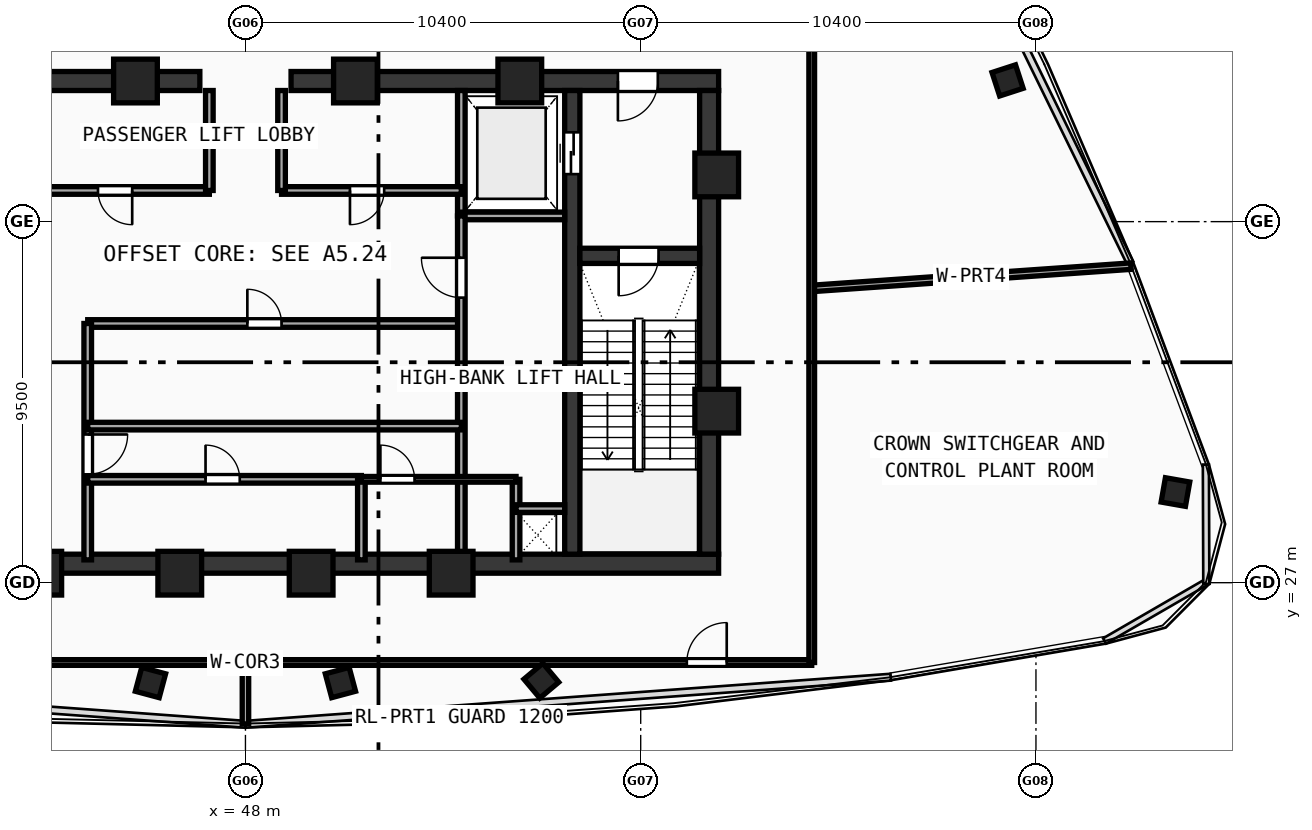
"""IFC4 building model, lengths in metres.
Left out: names, types, materials, properties, quantities, classifications, styles, units other than length and angle.
Written with IfcOpenShell. Run it as: python <this file> out.ifc"""

import sys

from ifc_helpers import new_model, si_unit, direction, frame, frame_2d, origin, origin_with_axes, origin_2d, place, context, subcontext, project, spatial, rectangle, hollow_rectangle, extrude, source, transform, mapped, element, fill, save


model = new_model("IFC4")
c1 = context("Model", 3, precision=1e-05, world=origin(), true_north=direction((0.0, 1.0)))
c2 = subcontext(c1, "Body", "Model", "MODEL_VIEW")
j1 = project(units=[si_unit("LENGTHUNIT", "METRE"), si_unit("PLANEANGLEUNIT", "RADIAN")], contexts=[c1])
p1 = place(None, origin())
s1 = spatial("IfcSite", under=j1, at=p1, CompositionType="ELEMENT")
p2 = place(p1, origin())
s2 = spatial("IfcBuilding", under=s1, at=p2, CompositionType="ELEMENT")
p3 = place(p2, frame((0.0, 0.0, 386.76)))
s3 = spatial("IfcBuildingStorey", under=s2, at=p3, CompositionType="ELEMENT", Elevation=386.76)
p4 = place(p3, frame((35.55, 27.5, 0.0), z_axis=(0.0, 0.0, 1.0), x_axis=(1.0, 0.0, 0.0)))
e1 = element("IfcWall", 1, at=p4, inside=s3, PredefinedType="SHEAR", context=c2, shape_type="SweptSolid", body=[
    extrude(rectangle(XDim=24.9, YDim=0.5, at=frame_2d((12.45, 0.0))), origin(), (0.0, 0.0, 1.0), 4.72),
])
p5 = place(p3, frame((35.55, 40.2, 0.0), z_axis=(0.0, 0.0, 1.0), x_axis=(1.0, 0.0, 0.0)))
e2 = element("IfcWall", 2, at=p5, inside=s3, PredefinedType="SHEAR", context=c2, shape_type="SweptSolid", body=[
    extrude(rectangle(XDim=11.25, YDim=0.5, at=frame_2d((5.625, 0.0))), origin(), (0.0, 0.0, 1.0), 4.72),
])
p6 = place(p5, frame((1.6, 0.0, 0.0)))
e3 = element("IfcOpeningElement", 3, at=p6, cuts=e2, PredefinedType="OPENING", context=c2, shape_type="SweptSolid", body=[
    extrude(rectangle(XDim=1.05, YDim=2.1, at=frame_2d((0.525, 1.05))), frame((0.0, 0.26, 0.0), z_axis=(0.0, -1.0, 0.0), x_axis=(1.0, 0.0, 0.0)), (0.0, 0.0, 1.0), 0.52),
])
p7 = place(p3, frame((49.2, 40.2, 0.0), z_axis=(0.0, 0.0, 1.0), x_axis=(1.0, 0.0, 0.0)))
e4 = element("IfcWall", 4, at=p7, inside=s3, PredefinedType="SHEAR", context=c2, shape_type="SweptSolid", body=[
    extrude(rectangle(XDim=11.25, YDim=0.5, at=frame_2d((5.625, 0.0))), origin(), (0.0, 0.0, 1.0), 4.72),
])
p8 = place(p7, frame((8.6, 0.0, 0.0)))
e5 = element("IfcOpeningElement", 5, at=p8, cuts=e4, PredefinedType="OPENING", context=c2, shape_type="SweptSolid", body=[
    extrude(rectangle(XDim=1.05, YDim=2.1, at=frame_2d((0.525, 1.05))), frame((0.0, 0.26, 0.0), z_axis=(0.0, -1.0, 0.0), x_axis=(1.0, 0.0, 0.0)), (0.0, 0.0, 1.0), 0.52),
])
p9 = place(p3, frame((60.2, 27.75, 0.0), z_axis=(0.0, 0.0, 1.0), x_axis=(0.0, 1.0, 0.0)))
e6 = element("IfcWall", 6, at=p9, inside=s3, PredefinedType="SHEAR", context=c2, shape_type="SweptSolid", body=[
    extrude(rectangle(XDim=12.2, YDim=0.5, at=frame_2d((6.1, 0.0))), origin(), (0.0, 0.0, 1.0), 4.72),
])
p10 = place(p3, frame((56.6, 27.75, 0.0), z_axis=(0.0, 0.0, 1.0), x_axis=(0.0, 1.0, 0.0)))
e7 = element("IfcWall", 7, at=p10, inside=s3, PredefinedType="SHEAR", context=c2, shape_type="SweptSolid", body=[
    extrude(rectangle(XDim=12.2, YDim=0.4, at=frame_2d((6.1, 0.0))), origin(), (0.0, 0.0, 1.0), 4.72),
])
p11 = place(p10, frame((10.0, 0.0, 0.0)))
e8 = element("IfcOpeningElement", 8, at=p11, cuts=e7, PredefinedType="OPENING", context=c2, shape_type="SweptSolid", body=[
    extrude(rectangle(XDim=1.1, YDim=2.1, at=frame_2d((0.55, 1.05))), frame((0.0, 0.21, 0.0), z_axis=(0.0, -1.0, 0.0), x_axis=(1.0, 0.0, 0.0)), (0.0, 0.0, 1.0), 0.42),
])
p12 = place(p3, frame((56.8, 35.6, 0.0), z_axis=(0.0, 0.0, 1.0), x_axis=(1.0, 0.0, 0.0)))
e9 = element("IfcWall", 9, at=p12, inside=s3, PredefinedType="SHEAR", context=c2, shape_type="SweptSolid", body=[
    extrude(rectangle(XDim=3.15, YDim=0.4, at=frame_2d((1.575, 0.0))), origin(), (0.0, 0.0, 1.0), 4.72),
])
p13 = place(p12, frame((1.02, 0.0, 0.0)))
e10 = element("IfcOpeningElement", 10, at=p13, cuts=e9, PredefinedType="OPENING", context=c2, shape_type="SweptSolid", body=[
    extrude(rectangle(XDim=1.05, YDim=2.1, at=frame_2d((0.525, 1.05))), frame((0.0, 0.21, 0.0), z_axis=(0.0, -1.0, 0.0), x_axis=(1.0, 0.0, 0.0)), (0.0, 0.0, 1.0), 0.42),
])
m1 = source(origin(), c2, "Body", "SweptSolid", [
    extrude(hollow_rectangle(XDim=1.15, YDim=1.15, WallThickness=0.048, at=origin_2d()), origin(), (0.0, 0.0, 1.0), 5.0),
])
for number, where, z_axis, x_axis in (
    (11, (42.588, 27.25, -0.28), (0.0, 0.0, 1.0), (1.0, 0.0, 0.0)),
    (12, (46.272, 27.25, -0.28), (0.0, 0.0, 1.0), (1.0, 0.0, 0.0)),
    (13, (49.729, 27.25, -0.28), (0.0, 0.0, 1.0), (1.0, 0.0, 0.0)),
    (14, (53.412, 27.25, -0.28), (0.0, 0.0, 1.0), (1.0, 0.0, 0.0)),
    (15, (60.4, 31.513, -0.28), (0.0, 0.0, 1.0), (1.0, 0.0, 0.0)),
    (16, (60.4, 37.729, -0.28), (0.0, 0.0, 1.0), (1.0, 0.0, 0.0)),
    (17, (55.219, 40.2, -0.28), (0.0, 0.0, 1.0), (1.0, 0.0, 0.0)),
    (18, (50.894, 40.2, -0.28), (0.0, 0.0, 1.0), (1.0, 0.0, 0.0)),
    (19, (45.106, 40.2, -0.28), (0.0, 0.0, 1.0), (1.0, 0.0, 0.0)),
):
    element("IfcColumn", number, at=place(p3, frame(where, z_axis=z_axis, x_axis=x_axis)), inside=s3, PredefinedType="COLUMN", context=c2, shape_type="MappedRepresentation", body=[
        mapped(m1, transform((0.0, 0.0, 0.0), scale=1.0)),
    ])
m2 = source(origin(), c2, "Body", "SweptSolid", [
    extrude(hollow_rectangle(XDim=0.65, YDim=0.65, WallThickness=0.024, at=origin_2d()), origin(), (0.0, 0.0, 1.0), 5.0),
])
for number, where, z_axis, x_axis in (
    (20, (45.501, 24.373, -0.28), (0.0, 0.0, 1.0), (0.966, -0.259, 0.0)),
    (21, (50.499, 24.373, -0.28), (0.0, 0.0, 1.0), (0.966, 0.259, 0.0)),
    (22, (55.785, 24.422, -0.28), (0.0, 0.0, 1.0), (0.766, 0.643, 0.0)),
    (23, (72.47, 29.385, -0.28), (0.0, 0.0, 1.0), (0.174, 0.985, 0.0)),
    (24, (68.053, 40.216, -0.28), (0.0, 0.0, 1.0), (-0.309, 0.951, 0.0)),
):
    element("IfcColumn", number, at=place(p3, frame(where, z_axis=z_axis, x_axis=x_axis)), inside=s3, PredefinedType="COLUMN", context=c2, shape_type="MappedRepresentation", body=[
        mapped(m2, transform((0.0, 0.0, 0.0), scale=1.0)),
    ])
p14 = place(p3, frame((53.68, 36.65, 0.0), z_axis=(0.0, 0.0, 1.0), x_axis=(0.0, 1.0, 0.0)))
e25 = element("IfcWall", 25, at=p14, inside=s3, PredefinedType="SOLIDWALL", context=c2, shape_type="SweptSolid", body=[
    extrude(rectangle(XDim=3.3, YDim=0.2, at=frame_2d((1.65, 0.0))), origin(), (0.0, 0.0, 1.0), 4.72),
])
p15 = place(p3, frame((53.68, 36.65, 0.0), z_axis=(0.0, 0.0, 1.0), x_axis=(1.0, 0.0, 0.0)))
e26 = element("IfcWall", 26, at=p15, inside=s3, PredefinedType="SOLIDWALL", context=c2, shape_type="SweptSolid", body=[
    extrude(rectangle(XDim=2.72, YDim=0.2, at=frame_2d((1.36, 0.0))), origin(), (0.0, 0.0, 1.0), 4.72),
])
p16 = place(p3, frame((42.32, 37.32, 0.0), z_axis=(0.0, 0.0, 1.0), x_axis=(1.0, 0.0, 0.0)))
e27 = element("IfcWall", 27, at=p16, inside=s3, PredefinedType="SOLIDWALL", context=c2, shape_type="SweptSolid", body=[
    extrude(rectangle(XDim=4.73, YDim=0.2, at=frame_2d((2.365, 0.0))), origin(), (0.0, 0.0, 1.0), 4.72),
])
p17 = place(p16, frame((1.8, 0.0, 0.0)))
e28 = element("IfcOpeningElement", 28, at=p17, cuts=e27, PredefinedType="OPENING", context=c2, shape_type="SweptSolid", body=[
    extrude(rectangle(XDim=0.9, YDim=2.1, at=frame_2d((0.45, 1.05))), frame((0.0, 0.11, 0.0), z_axis=(0.0, -1.0, 0.0), x_axis=(1.0, 0.0, 0.0)), (0.0, 0.0, 1.0), 0.22),
])
p18 = place(p3, frame((48.95, 37.32, 0.0), z_axis=(0.0, 0.0, 1.0), x_axis=(1.0, 0.0, 0.0)))
e29 = element("IfcWall", 29, at=p18, inside=s3, PredefinedType="SOLIDWALL", context=c2, shape_type="SweptSolid", body=[
    extrude(rectangle(XDim=4.73, YDim=0.2, at=frame_2d((2.365, 0.0))), origin(), (0.0, 0.0, 1.0), 4.72),
])
p19 = place(p18, frame((1.8, 0.0, 0.0)))
e30 = element("IfcOpeningElement", 30, at=p19, cuts=e29, PredefinedType="OPENING", context=c2, shape_type="SweptSolid", body=[
    extrude(rectangle(XDim=0.9, YDim=2.1, at=frame_2d((0.45, 1.05))), frame((0.0, 0.11, 0.0), z_axis=(0.0, -1.0, 0.0), x_axis=(1.0, 0.0, 0.0)), (0.0, 0.0, 1.0), 0.22),
])
for number, where, z_axis, x_axis in (
    (31, (47.05, 37.32, 0.0), (0.0, 0.0, 1.0), (0.0, 1.0, 0.0)),
    (32, (48.95, 37.32, 0.0), (0.0, 0.0, 1.0), (0.0, 1.0, 0.0)),
):
    element("IfcWall", number, at=place(p3, frame(where, z_axis=z_axis, x_axis=x_axis)), inside=s3, PredefinedType="SOLIDWALL", context=c2, shape_type="SweptSolid", body=[
        extrude(rectangle(XDim=2.63, YDim=0.2, at=frame_2d((1.315, 0.0))), origin(), (0.0, 0.0, 1.0), 4.72),
    ])
p20 = place(p3, frame((43.85, 33.82, 0.0), z_axis=(0.0, 0.0, 1.0), x_axis=(1.0, 0.0, 0.0)))
e33 = element("IfcWall", 33, at=p20, inside=s3, PredefinedType="SOLIDWALL", context=c2, shape_type="SweptSolid", body=[
    extrude(rectangle(XDim=9.83, YDim=0.2, at=frame_2d((4.915, 0.0))), origin(), (0.0, 0.0, 1.0), 4.72),
])
p21 = place(p20, frame((4.2, 0.0, 0.0)))
e34 = element("IfcOpeningElement", 34, at=p21, cuts=e33, PredefinedType="OPENING", context=c2, shape_type="SweptSolid", body=[
    extrude(rectangle(XDim=0.9, YDim=2.1, at=frame_2d((0.45, 1.05))), frame((0.0, 0.11, 0.0), z_axis=(0.0, -1.0, 0.0), x_axis=(1.0, 0.0, 0.0)), (0.0, 0.0, 1.0), 0.22),
])
p22 = place(p3, frame((43.85, 27.6, 0.0), z_axis=(0.0, 0.0, 1.0), x_axis=(0.0, 1.0, 0.0)))
e35 = element("IfcWall", 35, at=p22, inside=s3, PredefinedType="SOLIDWALL", context=c2, shape_type="SweptSolid", body=[
    extrude(rectangle(XDim=6.22, YDim=0.2, at=frame_2d((3.11, 0.0))), origin(), (0.0, 0.0, 1.0), 4.72),
])
p23 = place(p22, frame((2.25, 0.0, 0.0)))
e36 = element("IfcOpeningElement", 36, at=p23, cuts=e35, PredefinedType="OPENING", context=c2, shape_type="SweptSolid", body=[
    extrude(rectangle(XDim=1.05, YDim=2.1, at=frame_2d((0.525, 1.05))), frame((0.0, 0.11, 0.0), z_axis=(0.0, -1.0, 0.0), x_axis=(1.0, 0.0, 0.0)), (0.0, 0.0, 1.0), 0.22),
])
p24 = place(p3, frame((53.68, 27.6, 0.0), z_axis=(0.0, 0.0, 1.0), x_axis=(0.0, 1.0, 0.0)))
e37 = element("IfcWall", 37, at=p24, inside=s3, PredefinedType="SOLIDWALL", context=c2, shape_type="SweptSolid", body=[
    extrude(rectangle(XDim=9.05, YDim=0.2, at=frame_2d((4.525, 0.0))), origin(), (0.0, 0.0, 1.0), 4.72),
])
p25 = place(p24, frame((6.9, 0.0, 0.0)))
e38 = element("IfcOpeningElement", 38, at=p25, cuts=e37, PredefinedType="OPENING", context=c2, shape_type="SweptSolid", body=[
    extrude(rectangle(XDim=1.05, YDim=2.1, at=frame_2d((0.525, 1.05))), frame((0.0, 0.11, 0.0), z_axis=(0.0, -1.0, 0.0), x_axis=(1.0, 0.0, 0.0)), (0.0, 0.0, 1.0), 0.22),
])
p26 = place(p3, frame((43.85, 29.72, 0.0), z_axis=(0.0, 0.0, 1.0), x_axis=(1.0, 0.0, 0.0)))
e39 = element("IfcWall", 39, at=p26, inside=s3, PredefinedType="SOLIDWALL", context=c2, shape_type="SweptSolid", body=[
    extrude(rectangle(XDim=7.2, YDim=0.2, at=frame_2d((3.6, 0.0))), origin(), (0.0, 0.0, 1.0), 4.72),
])
p27 = place(p26, frame((3.1, 0.0, 0.0)))
e40 = element("IfcOpeningElement", 40, at=p27, cuts=e39, PredefinedType="OPENING", context=c2, shape_type="SweptSolid", body=[
    extrude(rectangle(XDim=0.9, YDim=2.1, at=frame_2d((0.45, 1.05))), frame((0.0, 0.11, 0.0), z_axis=(0.0, -1.0, 0.0), x_axis=(1.0, 0.0, 0.0)), (0.0, 0.0, 1.0), 0.22),
])
p28 = place(p3, frame((51.05, 27.6, 0.0), z_axis=(0.0, 0.0, 1.0), x_axis=(0.0, 1.0, 0.0)))
e41 = element("IfcWall", 41, at=p28, inside=s3, PredefinedType="SOLIDWALL", context=c2, shape_type="SweptSolid", body=[
    extrude(rectangle(XDim=2.12, YDim=0.2, at=frame_2d((1.06, 0.0))), origin(), (0.0, 0.0, 1.0), 4.72),
])
p29 = place(p3, frame((43.85, 31.12, 0.0), z_axis=(0.0, 0.0, 1.0), x_axis=(1.0, 0.0, 0.0)))
e42 = element("IfcWall", 42, at=p29, inside=s3, PredefinedType="SOLIDWALL", context=c2, shape_type="SweptSolid", body=[
    extrude(rectangle(XDim=9.83, YDim=0.2, at=frame_2d((4.915, 0.0))), origin(), (0.0, 0.0, 1.0), 4.72),
])
p30 = place(p3, frame((55.12, 27.6, 0.0), z_axis=(0.0, 0.0, 1.0), x_axis=(0.0, 1.0, 0.0)))
e43 = element("IfcWall", 43, at=p30, inside=s3, PredefinedType="SOLIDWALL", context=c2, shape_type="SweptSolid", body=[
    extrude(rectangle(XDim=2.12, YDim=0.2, at=frame_2d((1.06, 0.0))), origin(), (0.0, 0.0, 1.0), 4.72),
])
p31 = place(p3, frame((55.12, 28.95, 0.0), z_axis=(0.0, 0.0, 1.0), x_axis=(1.0, 0.0, 0.0)))
e44 = element("IfcWall", 44, at=p31, inside=s3, PredefinedType="SOLIDWALL", context=c2, shape_type="SweptSolid", body=[
    extrude(rectangle(XDim=1.28, YDim=0.2, at=frame_2d((0.64, 0.0))), origin(), (0.0, 0.0, 1.0), 4.72),
])
p32 = place(p3, frame((51.05, 29.72, 0.0), z_axis=(0.0, 0.0, 1.0), x_axis=(1.0, 0.0, 0.0)))
e45 = element("IfcWall", 45, at=p32, inside=s3, PredefinedType="PARTITIONING", context=c2, shape_type="SweptSolid", body=[
    extrude(rectangle(XDim=4.07, YDim=0.15, at=frame_2d((2.035, 0.0))), origin(), (0.0, 0.0, 1.0), 4.72),
])
p33 = place(p32, frame((0.5, 0.0, 0.0)))
e46 = element("IfcOpeningElement", 46, at=p33, cuts=e45, PredefinedType="OPENING", context=c2, shape_type="SweptSolid", body=[
    extrude(rectangle(XDim=0.9, YDim=2.1, at=frame_2d((0.45, 1.05))), frame((0.0, 0.085, 0.0), z_axis=(0.0, -1.0, 0.0), x_axis=(1.0, 0.0, 0.0)), (0.0, 0.0, 1.0), 0.17),
])
p34 = place(p3, frame((62.9, 34.742, 0.0), z_axis=(0.0, 0.0, 1.0), x_axis=(0.997563993403, 0.069757286835, 0.0)))
e47 = element("IfcWall", 47, at=p34, inside=s3, PredefinedType="PARTITIONING", context=c2, shape_type="SweptSolid", body=[
    extrude(rectangle(XDim=8.421, YDim=0.17, at=frame_2d((4.21, 0.0))), origin(), (0.0, 0.0, 1.0), 4.12),
])
p35 = place(p3, frame((48.0, 24.9, 0.0), z_axis=(0.0, 0.0, 1.0), x_axis=(0.0, -1.0, 0.0)))
e48 = element("IfcWall", 48, at=p35, inside=s3, PredefinedType="PARTITIONING", context=c2, shape_type="SweptSolid", body=[
    extrude(rectangle(XDim=1.616, YDim=0.17, at=frame_2d((0.808, 0.0))), origin(), (0.0, 0.0, 1.0), 4.12),
])
p36 = place(p3, frame((33.1, 24.9, 0.0), z_axis=(0.0, 0.0, 1.0), x_axis=(1.0, 0.0, 0.0)))
e49 = element("IfcWall", 49, at=p36, inside=s3, PredefinedType="PARTITIONING", context=c2, shape_type="SweptSolid", body=[
    extrude(rectangle(XDim=29.8, YDim=0.15, at=frame_2d((14.9, 0.0))), origin(), (0.0, 0.0, 1.0), 4.12),
])
p37 = place(p36, frame((2.236, 0.0, 0.0)))
e50 = element("IfcOpeningElement", 50, at=p37, cuts=e49, PredefinedType="OPENING", context=c2, shape_type="SweptSolid", body=[
    extrude(rectangle(XDim=1.05, YDim=2.1, at=frame_2d((0.525, 1.05))), frame((0.0, 0.085, 0.0), z_axis=(0.0, -1.0, 0.0), x_axis=(1.0, 0.0, 0.0)), (0.0, 0.0, 1.0), 0.17),
])
p38 = place(p36, frame((26.514, 0.0, 0.0)))
e51 = element("IfcOpeningElement", 51, at=p38, cuts=e49, PredefinedType="OPENING", context=c2, shape_type="SweptSolid", body=[
    extrude(rectangle(XDim=1.05, YDim=2.1, at=frame_2d((0.525, 1.05))), frame((0.0, 0.085, 0.0), z_axis=(0.0, -1.0, 0.0), x_axis=(1.0, 0.0, 0.0)), (0.0, 0.0, 1.0), 0.17),
])
p39 = place(p3, frame((62.9, 24.9, 0.0), z_axis=(0.0, 0.0, 1.0), x_axis=(0.0, 1.0, 0.0)))
e52 = element("IfcWall", 52, at=p39, inside=s3, PredefinedType="PARTITIONING", context=c2, shape_type="SweptSolid", body=[
    extrude(rectangle(XDim=18.0, YDim=0.15, at=frame_2d((9.0, 0.0))), origin(), (0.0, 0.0, 1.0), 4.12),
])
m3 = source(origin(), c2, "Body", "SweptSolid", [
    extrude(rectangle(XDim=1.05, YDim=2.1, at=frame_2d((0.525, 1.05))), frame((0.0, 0.025, 0.0), z_axis=(0.0, -1.0, 0.0), x_axis=(1.0, 0.0, 0.0)), (0.0, 0.0, 1.0), 0.05),
])
p40 = place(p13, frame((1.05, 0.0, 0.0), z_axis=(0.0, 0.0, 1.0), x_axis=(-1.0, 0.0, 0.0)))
e53 = element("IfcDoor", 53, at=p40, inside=s3, OperationType="SINGLE_SWING_RIGHT", PredefinedType="DOOR", context=c2, shape_type="MappedRepresentation", body=[
    mapped(m3, transform((0.0, 0.0, 0.0), scale=1.0)),
])
fill(e10, e53)
p41 = place(p8, frame((1.05, 0.0, 0.0), z_axis=(0.0, 0.0, 1.0), x_axis=(-1.0, 0.0, 0.0)))
e54 = element("IfcDoor", 54, at=p41, inside=s3, OperationType="SINGLE_SWING_RIGHT", PredefinedType="DOOR", context=c2, shape_type="MappedRepresentation", body=[
    mapped(m3, transform((0.0, 0.0, 0.0), scale=1.0)),
])
fill(e5, e54)
m4 = source(origin(), c2, "Body", "SweptSolid", [
    extrude(rectangle(XDim=1.1, YDim=2.1, at=frame_2d((0.55, 1.05))), frame((0.0, 0.025, 0.0), z_axis=(0.0, -1.0, 0.0), x_axis=(1.0, 0.0, 0.0)), (0.0, 0.0, 1.0), 0.05),
])
p42 = place(p11, origin_with_axes())
e55 = element("IfcDoor", 55, at=p42, inside=s3, OperationType="DOUBLE_DOOR_SLIDING", PredefinedType="DOOR", context=c2, shape_type="MappedRepresentation", body=[
    mapped(m4, transform((0.0, 0.0, 0.0), scale=1.0)),
])
fill(e8, e55)
m5 = source(origin(), c2, "Body", "SweptSolid", [
    extrude(rectangle(XDim=0.9, YDim=2.1, at=frame_2d((0.45, 1.05))), frame((0.0, 0.025, 0.0), z_axis=(0.0, -1.0, 0.0), x_axis=(1.0, 0.0, 0.0)), (0.0, 0.0, 1.0), 0.05),
])
p43 = place(p17, frame((0.9, 0.0, 0.0), z_axis=(0.0, 0.0, 1.0), x_axis=(-1.0, 0.0, 0.0)))
e56 = element("IfcDoor", 56, at=p43, inside=s3, OperationType="SINGLE_SWING_LEFT", PredefinedType="DOOR", context=c2, shape_type="MappedRepresentation", body=[
    mapped(m5, transform((0.0, 0.0, 0.0), scale=1.0)),
])
fill(e28, e56)
p44 = place(p19, frame((0.9, 0.0, 0.0), z_axis=(0.0, 0.0, 1.0), x_axis=(-1.0, 0.0, 0.0)))
e57 = element("IfcDoor", 57, at=p44, inside=s3, OperationType="SINGLE_SWING_RIGHT", PredefinedType="DOOR", context=c2, shape_type="MappedRepresentation", body=[
    mapped(m5, transform((0.0, 0.0, 0.0), scale=1.0)),
])
fill(e30, e57)
p45 = place(p21, origin_with_axes())
e58 = element("IfcDoor", 58, at=p45, inside=s3, OperationType="SINGLE_SWING_LEFT", PredefinedType="DOOR", context=c2, shape_type="MappedRepresentation", body=[
    mapped(m5, transform((0.0, 0.0, 0.0), scale=1.0)),
])
fill(e34, e58)
p46 = place(p23, frame((1.05, 0.0, 0.0), z_axis=(0.0, 0.0, 1.0), x_axis=(-1.0, 0.0, 0.0)))
e59 = element("IfcDoor", 59, at=p46, inside=s3, OperationType="SINGLE_SWING_LEFT", PredefinedType="DOOR", context=c2, shape_type="MappedRepresentation", body=[
    mapped(m3, transform((0.0, 0.0, 0.0), scale=1.0)),
])
fill(e36, e59)
p47 = place(p25, origin_with_axes())
e60 = element("IfcDoor", 60, at=p47, inside=s3, OperationType="SINGLE_SWING_RIGHT", PredefinedType="DOOR", context=c2, shape_type="MappedRepresentation", body=[
    mapped(m3, transform((0.0, 0.0, 0.0), scale=1.0)),
])
fill(e38, e60)
p48 = place(p27, origin_with_axes())
e61 = element("IfcDoor", 61, at=p48, inside=s3, OperationType="SINGLE_SWING_LEFT", PredefinedType="DOOR", context=c2, shape_type="MappedRepresentation", body=[
    mapped(m5, transform((0.0, 0.0, 0.0), scale=1.0)),
])
fill(e40, e61)
p49 = place(p33, origin_with_axes())
e62 = element("IfcDoor", 62, at=p49, inside=s3, OperationType="SINGLE_SWING_LEFT", PredefinedType="DOOR", context=c2, shape_type="MappedRepresentation", body=[
    mapped(m5, transform((0.0, 0.0, 0.0), scale=1.0)),
])
fill(e46, e62)
p50 = place(p38, origin_with_axes())
e63 = element("IfcDoor", 63, at=p50, inside=s3, OperationType="SINGLE_SWING_RIGHT", PredefinedType="DOOR", context=c2, shape_type="MappedRepresentation", body=[
    mapped(m3, transform((0.0, 0.0, 0.0), scale=1.0)),
])
fill(e51, e63)
save(model, sys.argv[1])
